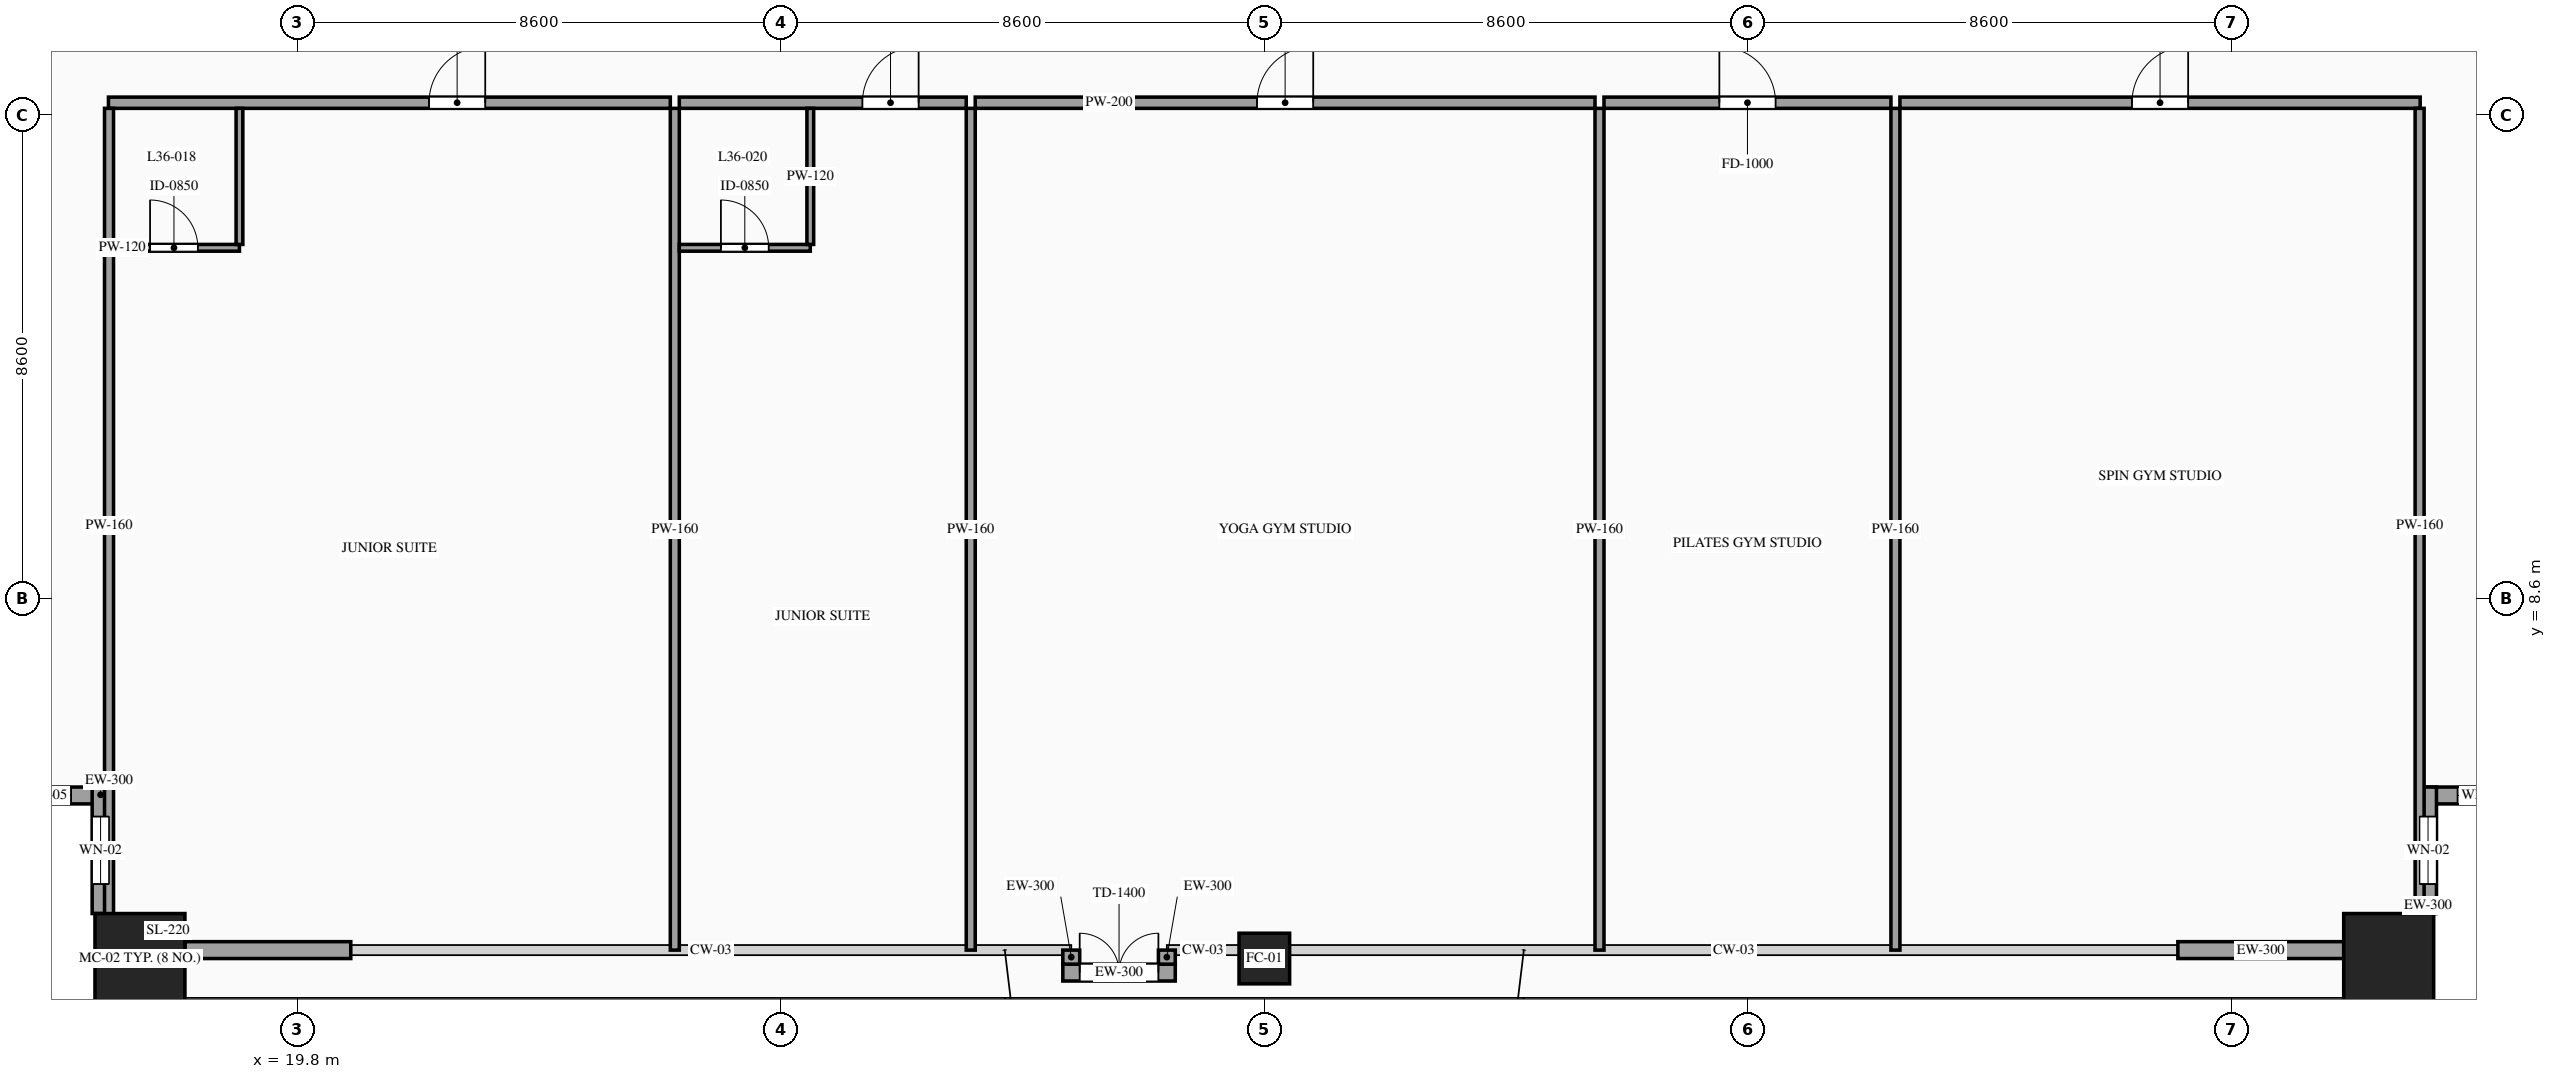
"""IFC4 building model, lengths in metres.
Left out: names, types, materials, properties, quantities, classifications, styles, units other than length and angle.
Written with IfcOpenShell. Run it as: python <this file> out.ifc"""

import sys

from ifc_helpers import new_model, si_unit, direction, frame, frame_2d, origin, origin_2d, place, context, subcontext, project, spatial, rectangle, hollow_rectangle, extrude, source, transform, mapped, element, fill, save


model = new_model("IFC4")
c1 = context("Model", 3, precision=1e-05, world=origin(), true_north=direction((0.0, 1.0)))
c2 = subcontext(c1, "Body", "Model", "MODEL_VIEW")
j1 = project(units=[si_unit("LENGTHUNIT", "METRE"), si_unit("PLANEANGLEUNIT", "RADIAN")], contexts=[c1])
p1 = place(None, origin())
s1 = spatial("IfcSite", under=j1, at=p1, CompositionType="ELEMENT")
p2 = place(p1, origin())
s2 = spatial("IfcBuilding", under=s1, at=p2, CompositionType="ELEMENT")
p3 = place(p2, frame((0.0, 0.0, 138.0)))
s3 = spatial("IfcBuildingStorey", under=s2, at=p3, CompositionType="ELEMENT", Elevation=138.0)
m1 = source(origin(), c2, "Body", "SweptSolid", [
    extrude(hollow_rectangle(XDim=1.6, YDim=1.6, WallThickness=0.07, at=origin_2d()), origin(), (0.0, 0.0, 1.0), 3.6),
])
p4 = place(p3, frame((17.0, 2.2, 0.0), z_axis=(0.0, 0.0, 1.0), x_axis=(1.0, 0.0, 0.0)))
e1 = element("IfcColumn", 1, at=p4, inside=s3, PredefinedType="COLUMN", context=c2, shape_type="MappedRepresentation", body=[
    mapped(m1, transform((0.0, 0.0, 0.0), scale=1.0)),
])
m2 = source(origin(), c2, "Body", "SweptSolid", [
    extrude(hollow_rectangle(XDim=0.9, YDim=0.9, WallThickness=0.042, at=origin_2d()), origin(), (0.0, 0.0, 1.0), 3.6),
])
p5 = place(p3, frame((37.0, 2.2, 0.0), z_axis=(0.0, 0.0, 1.0), x_axis=(1.0, 0.0, 0.0)))
e2 = element("IfcColumn", 2, at=p5, inside=s3, PredefinedType="COLUMN", context=c2, shape_type="MappedRepresentation", body=[
    mapped(m2, transform((0.0, 0.0, 0.0), scale=1.0)),
])
p6 = place(p3, frame((57.0, 2.2, 0.0), z_axis=(0.0, 0.0, 1.0), x_axis=(1.0, 0.0, 0.0)))
e3 = element("IfcColumn", 3, at=p6, inside=s3, PredefinedType="COLUMN", context=c2, shape_type="MappedRepresentation", body=[
    mapped(m1, transform((0.0, 0.0, 0.0), scale=1.0)),
])
p7 = place(p3, frame((14.2, 5.1, 0.0), z_axis=(0.0, 0.0, 1.0), x_axis=(1.0, 0.0, 0.0)))
e4 = element("IfcWall", 4, at=p7, inside=s3, PredefinedType="SOLIDWALL", context=c2, shape_type="SweptSolid", body=[
    extrude(rectangle(XDim=2.25, YDim=0.3, at=frame_2d((1.125, 0.0))), origin(), (0.0, 0.0, 1.0), 3.38),
])
p8 = place(p7, frame((0.675, 0.0, 0.85)))
e5 = element("IfcOpeningElement", 5, at=p8, cuts=e4, PredefinedType="OPENING", context=c2, shape_type="SweptSolid", body=[
    extrude(rectangle(XDim=0.9, YDim=1.5, at=frame_2d((0.45, 0.75))), frame((0.0, 0.165, 0.0), z_axis=(0.0, -1.0, 0.0), x_axis=(1.0, 0.0, 0.0)), (0.0, 0.0, 1.0), 0.33),
])
p9 = place(p3, frame((16.3, 5.25, 0.0), z_axis=(0.0, 0.0, 1.0), x_axis=(0.0, -1.0, 0.0)))
e6 = element("IfcWall", 6, at=p9, inside=s3, PredefinedType="SOLIDWALL", context=c2, shape_type="SweptSolid", body=[
    extrude(rectangle(XDim=2.25, YDim=0.3, at=frame_2d((1.125, 0.0))), origin(), (0.0, 0.0, 1.0), 3.38),
])
p10 = place(p9, frame((0.525, 0.0, 0.85)))
e7 = element("IfcOpeningElement", 7, at=p10, cuts=e6, PredefinedType="OPENING", context=c2, shape_type="SweptSolid", body=[
    extrude(rectangle(XDim=1.2, YDim=2.1, at=frame_2d((0.6, 1.05))), frame((0.0, 0.165, 0.0), z_axis=(0.0, -1.0, 0.0), x_axis=(1.0, 0.0, 0.0)), (0.0, 0.0, 1.0), 0.33),
])
p11 = place(p3, frame((57.55, 5.1, 0.0), z_axis=(0.0, 0.0, 1.0), x_axis=(1.0, 0.0, 0.0)))
e8 = element("IfcWall", 8, at=p11, inside=s3, PredefinedType="SOLIDWALL", context=c2, shape_type="SweptSolid", body=[
    extrude(rectangle(XDim=2.25, YDim=0.3, at=frame_2d((1.125, 0.0))), origin(), (0.0, 0.0, 1.0), 3.38),
])
p12 = place(p11, frame((0.675, 0.0, 0.85)))
e9 = element("IfcOpeningElement", 9, at=p12, cuts=e8, PredefinedType="OPENING", context=c2, shape_type="SweptSolid", body=[
    extrude(rectangle(XDim=0.9, YDim=1.5, at=frame_2d((0.45, 0.75))), frame((0.0, 0.165, 0.0), z_axis=(0.0, -1.0, 0.0), x_axis=(1.0, 0.0, 0.0)), (0.0, 0.0, 1.0), 0.33),
])
p13 = place(p3, frame((57.7, 3.0, 0.0), z_axis=(0.0, 0.0, 1.0), x_axis=(0.0, 1.0, 0.0)))
e10 = element("IfcWall", 10, at=p13, inside=s3, PredefinedType="SOLIDWALL", context=c2, shape_type="SweptSolid", body=[
    extrude(rectangle(XDim=2.25, YDim=0.3, at=frame_2d((1.125, 0.0))), origin(), (0.0, 0.0, 1.0), 3.38),
])
p14 = place(p13, frame((0.525, 0.0, 0.85)))
e11 = element("IfcOpeningElement", 11, at=p14, cuts=e10, PredefinedType="OPENING", context=c2, shape_type="SweptSolid", body=[
    extrude(rectangle(XDim=1.2, YDim=2.1, at=frame_2d((0.6, 1.05))), frame((0.0, 0.165, 0.0), z_axis=(0.0, -1.0, 0.0), x_axis=(1.0, 0.0, 0.0)), (0.0, 0.0, 1.0), 0.33),
])
m3 = source(origin(), c2, "Body", "SweptSolid", [
    extrude(rectangle(XDim=2.95, YDim=0.3, at=frame_2d((1.475, 0.0))), origin(), (0.0, 0.0, 1.0), 2.775),
])
for number, where, z_axis, x_axis in (
    (12, (17.8, 2.35, 0.0), (0.0, 0.0, 1.0), (1.0, 0.0, 0.0)),
    (13, (53.25, 2.35, 0.0), (0.0, 0.0, 1.0), (1.0, 0.0, 0.0)),
):
    element("IfcWall", number, at=place(p3, frame(where, z_axis=z_axis, x_axis=x_axis)), inside=s3, PredefinedType="SOLIDWALL", context=c2, shape_type="MappedRepresentation", body=[
        mapped(m3, transform((0.0, 0.0, 0.0), scale=1.0)),
    ])
p15 = place(p3, frame((33.416, 1.95, 0.0), z_axis=(0.0, 0.0, 1.0), x_axis=(1.0, 0.0, 0.0)))
e14 = element("IfcWall", 14, at=p15, inside=s3, PredefinedType="SOLIDWALL", context=c2, shape_type="SweptSolid", body=[
    extrude(rectangle(XDim=2.0, YDim=0.3, at=frame_2d((1.0, 0.0))), origin(), (0.0, 0.0, 1.0), 3.38),
])
p16 = place(p15, frame((0.3, 0.0, 0.0)))
e15 = element("IfcOpeningElement", 15, at=p16, cuts=e14, PredefinedType="OPENING", context=c2, shape_type="SweptSolid", body=[
    extrude(rectangle(XDim=1.4, YDim=2.3, at=frame_2d((0.7, 1.15))), frame((0.0, 0.165, 0.0), z_axis=(0.0, -1.0, 0.0), x_axis=(1.0, 0.0, 0.0)), (0.0, 0.0, 1.0), 0.33),
])
m4 = source(origin(), c2, "Body", "SweptSolid", [
    extrude(rectangle(XDim=0.25, YDim=0.3, at=frame_2d((0.125, 0.0))), origin(), (0.0, 0.0, 1.0), 3.38),
])
for number, where, z_axis, x_axis in (
    (16, (33.566, 2.35, 0.0), (0.0, 0.0, 1.0), (0.0, -1.0, 0.0)),
    (17, (35.266, 2.1, 0.0), (0.0, 0.0, 1.0), (0.0, 1.0, 0.0)),
):
    element("IfcWall", number, at=place(p3, frame(where, z_axis=z_axis, x_axis=x_axis)), inside=s3, PredefinedType="SOLIDWALL", context=c2, shape_type="MappedRepresentation", body=[
        mapped(m4, transform((0.0, 0.0, 0.0), scale=1.0)),
    ])
p17 = place(p3, frame((16.44, 17.42, 0.0), z_axis=(0.0, 0.0, 1.0), x_axis=(1.0, 0.0, 0.0)))
e18 = element("IfcWall", 18, at=p17, inside=s3, PredefinedType="PARTITIONING", context=c2, shape_type="SweptSolid", body=[
    extrude(rectangle(XDim=9.994, YDim=0.2, at=frame_2d((4.997, 0.0))), origin(), (0.0, 0.0, 1.0), 3.38),
])
p18 = place(p17, frame((5.702, 0.0, 0.0)))
e19 = element("IfcOpeningElement", 19, at=p18, cuts=e18, PredefinedType="OPENING", context=c2, shape_type="SweptSolid", body=[
    extrude(rectangle(XDim=1.0, YDim=2.2, at=frame_2d((0.5, 1.1))), frame((0.0, 0.115, 0.0), z_axis=(0.0, -1.0, 0.0), x_axis=(1.0, 0.0, 0.0)), (0.0, 0.0, 1.0), 0.23),
])
m5 = source(origin(), c2, "Body", "SweptSolid", [
    extrude(rectangle(XDim=14.97, YDim=0.16, at=frame_2d((7.485, 0.0))), origin(), (0.0, 0.0, 1.0), 3.38),
])
p19 = place(p3, frame((26.514, 2.35, 0.0), z_axis=(0.0, 0.0, 1.0), x_axis=(0.0, 1.0, 0.0)))
e20 = element("IfcWall", 20, at=p19, inside=s3, PredefinedType="PARTITIONING", context=c2, shape_type="MappedRepresentation", body=[
    mapped(m5, transform((0.0, 0.0, 0.0), scale=1.0)),
])
p20 = place(p3, frame((16.44, 14.84, 0.0), z_axis=(0.0, 0.0, 1.0), x_axis=(1.0, 0.0, 0.0)))
e21 = element("IfcWall", 21, at=p20, inside=s3, PredefinedType="PARTITIONING", context=c2, shape_type="SweptSolid", body=[
    extrude(rectangle(XDim=2.33, YDim=0.12, at=frame_2d((1.165, 0.0))), origin(), (0.0, 0.0, 1.0), 3.38),
])
p21 = place(p20, frame((0.74, 0.0, 0.0)))
e22 = element("IfcOpeningElement", 22, at=p21, cuts=e21, PredefinedType="OPENING", context=c2, shape_type="SweptSolid", body=[
    extrude(rectangle(XDim=0.85, YDim=2.1, at=frame_2d((0.425, 1.05))), frame((0.0, 0.075, 0.0), z_axis=(0.0, -1.0, 0.0), x_axis=(1.0, 0.0, 0.0)), (0.0, 0.0, 1.0), 0.15),
])
m6 = source(origin(), c2, "Body", "SweptSolid", [
    extrude(rectangle(XDim=2.42, YDim=0.12, at=frame_2d((1.21, 0.0))), origin(), (0.0, 0.0, 1.0), 3.38),
])
p22 = place(p3, frame((18.77, 14.9, 0.0), z_axis=(0.0, 0.0, 1.0), x_axis=(0.0, 1.0, 0.0)))
e23 = element("IfcWall", 23, at=p22, inside=s3, PredefinedType="PARTITIONING", context=c2, shape_type="MappedRepresentation", body=[
    mapped(m6, transform((0.0, 0.0, 0.0), scale=1.0)),
])
p23 = place(p3, frame((26.594, 17.42, 0.0), z_axis=(0.0, 0.0, 1.0), x_axis=(1.0, 0.0, 0.0)))
e24 = element("IfcWall", 24, at=p23, inside=s3, PredefinedType="PARTITIONING", context=c2, shape_type="SweptSolid", body=[
    extrude(rectangle(XDim=5.104, YDim=0.2, at=frame_2d((2.552, 0.0))), origin(), (0.0, 0.0, 1.0), 3.38),
])
p24 = place(p23, frame((3.257, 0.0, 0.0)))
e25 = element("IfcOpeningElement", 25, at=p24, cuts=e24, PredefinedType="OPENING", context=c2, shape_type="SweptSolid", body=[
    extrude(rectangle(XDim=1.0, YDim=2.2, at=frame_2d((0.5, 1.1))), frame((0.0, 0.115, 0.0), z_axis=(0.0, -1.0, 0.0), x_axis=(1.0, 0.0, 0.0)), (0.0, 0.0, 1.0), 0.23),
])
p25 = place(p3, frame((31.778, 2.35, 0.0), z_axis=(0.0, 0.0, 1.0), x_axis=(0.0, 1.0, 0.0)))
e26 = element("IfcWall", 26, at=p25, inside=s3, PredefinedType="PARTITIONING", context=c2, shape_type="MappedRepresentation", body=[
    mapped(m5, transform((0.0, 0.0, 0.0), scale=1.0)),
])
p26 = place(p3, frame((26.594, 14.84, 0.0), z_axis=(0.0, 0.0, 1.0), x_axis=(1.0, 0.0, 0.0)))
e27 = element("IfcWall", 27, at=p26, inside=s3, PredefinedType="PARTITIONING", context=c2, shape_type="SweptSolid", body=[
    extrude(rectangle(XDim=2.33, YDim=0.12, at=frame_2d((1.165, 0.0))), origin(), (0.0, 0.0, 1.0), 3.38),
])
p27 = place(p26, frame((0.74, 0.0, 0.0)))
e28 = element("IfcOpeningElement", 28, at=p27, cuts=e27, PredefinedType="OPENING", context=c2, shape_type="SweptSolid", body=[
    extrude(rectangle(XDim=0.85, YDim=2.1, at=frame_2d((0.425, 1.05))), frame((0.0, 0.075, 0.0), z_axis=(0.0, -1.0, 0.0), x_axis=(1.0, 0.0, 0.0)), (0.0, 0.0, 1.0), 0.15),
])
p28 = place(p3, frame((28.924, 14.9, 0.0), z_axis=(0.0, 0.0, 1.0), x_axis=(0.0, 1.0, 0.0)))
e29 = element("IfcWall", 29, at=p28, inside=s3, PredefinedType="PARTITIONING", context=c2, shape_type="MappedRepresentation", body=[
    mapped(m6, transform((0.0, 0.0, 0.0), scale=1.0)),
])
p29 = place(p3, frame((31.858, 17.42, 0.0), z_axis=(0.0, 0.0, 1.0), x_axis=(1.0, 0.0, 0.0)))
e30 = element("IfcWall", 30, at=p29, inside=s3, PredefinedType="PARTITIONING", context=c2, shape_type="SweptSolid", body=[
    extrude(rectangle(XDim=11.024, YDim=0.2, at=frame_2d((5.512, 0.0))), origin(), (0.0, 0.0, 1.0), 3.38),
])
p30 = place(p29, frame((5.012, 0.0, 0.0)))
e31 = element("IfcOpeningElement", 31, at=p30, cuts=e30, PredefinedType="OPENING", context=c2, shape_type="SweptSolid", body=[
    extrude(rectangle(XDim=1.0, YDim=2.2, at=frame_2d((0.5, 1.1))), frame((0.0, 0.115, 0.0), z_axis=(0.0, -1.0, 0.0), x_axis=(1.0, 0.0, 0.0)), (0.0, 0.0, 1.0), 0.23),
])
p31 = place(p3, frame((42.962, 2.35, 0.0), z_axis=(0.0, 0.0, 1.0), x_axis=(0.0, 1.0, 0.0)))
e32 = element("IfcWall", 32, at=p31, inside=s3, PredefinedType="PARTITIONING", context=c2, shape_type="MappedRepresentation", body=[
    mapped(m5, transform((0.0, 0.0, 0.0), scale=1.0)),
])
p32 = place(p3, frame((43.042, 17.42, 0.0), z_axis=(0.0, 0.0, 1.0), x_axis=(1.0, 0.0, 0.0)))
e33 = element("IfcWall", 33, at=p32, inside=s3, PredefinedType="PARTITIONING", context=c2, shape_type="SweptSolid", body=[
    extrude(rectangle(XDim=5.104, YDim=0.2, at=frame_2d((2.552, 0.0))), origin(), (0.0, 0.0, 1.0), 3.38),
])
p33 = place(p32, frame((2.052, 0.0, 0.0)))
e34 = element("IfcOpeningElement", 34, at=p33, cuts=e33, PredefinedType="OPENING", context=c2, shape_type="SweptSolid", body=[
    extrude(rectangle(XDim=1.0, YDim=2.2, at=frame_2d((0.5, 1.1))), frame((0.0, 0.115, 0.0), z_axis=(0.0, -1.0, 0.0), x_axis=(1.0, 0.0, 0.0)), (0.0, 0.0, 1.0), 0.23),
])
p34 = place(p3, frame((48.226, 2.35, 0.0), z_axis=(0.0, 0.0, 1.0), x_axis=(0.0, 1.0, 0.0)))
e35 = element("IfcWall", 35, at=p34, inside=s3, PredefinedType="PARTITIONING", context=c2, shape_type="MappedRepresentation", body=[
    mapped(m5, transform((0.0, 0.0, 0.0), scale=1.0)),
])
p35 = place(p3, frame((48.306, 17.42, 0.0), z_axis=(0.0, 0.0, 1.0), x_axis=(1.0, 0.0, 0.0)))
e36 = element("IfcWall", 36, at=p35, inside=s3, PredefinedType="PARTITIONING", context=c2, shape_type="SweptSolid", body=[
    extrude(rectangle(XDim=9.254, YDim=0.2, at=frame_2d((4.627, 0.0))), origin(), (0.0, 0.0, 1.0), 3.38),
])
p36 = place(p35, frame((4.127, 0.0, 0.0)))
e37 = element("IfcOpeningElement", 37, at=p36, cuts=e36, PredefinedType="OPENING", context=c2, shape_type="SweptSolid", body=[
    extrude(rectangle(XDim=1.0, YDim=2.2, at=frame_2d((0.5, 1.1))), frame((0.0, 0.115, 0.0), z_axis=(0.0, -1.0, 0.0), x_axis=(1.0, 0.0, 0.0)), (0.0, 0.0, 1.0), 0.23),
])
m7 = source(origin(), c2, "Body", "SweptSolid", [
    extrude(rectangle(XDim=14.82, YDim=0.16, at=frame_2d((7.41, 0.0))), origin(), (0.0, 0.0, 1.0), 3.38),
])
for number, where, z_axis, x_axis in (
    (38, (16.45, 2.5, 0.0), (0.0, 0.0, 1.0), (0.0, 1.0, 0.0)),
    (39, (57.55, 2.5, 0.0), (0.0, 0.0, 1.0), (0.0, 1.0, 0.0)),
):
    element("IfcWall", number, at=place(p3, frame(where, z_axis=z_axis, x_axis=x_axis)), inside=s3, PredefinedType="PARTITIONING", context=c2, shape_type="MappedRepresentation", body=[
        mapped(m7, transform((0.0, 0.0, 0.0), scale=1.0)),
    ])
m8 = source(origin(), c2, "Body", "SweptSolid", [
    extrude(rectangle(XDim=0.9, YDim=1.5, at=frame_2d((0.45, 0.75))), frame((0.0, 0.03, 0.0), z_axis=(0.0, -1.0, 0.0), x_axis=(1.0, 0.0, 0.0)), (0.0, 0.0, 1.0), 0.06),
])
p37 = place(p8, origin())
e40 = element("IfcWindow", 40, at=p37, inside=s3, PartitioningType="SINGLE_PANEL", PredefinedType="WINDOW", context=c2, shape_type="MappedRepresentation", body=[
    mapped(m8, transform((0.0, 0.0, 0.0), scale=1.0)),
])
fill(e5, e40)
m9 = source(origin(), c2, "Body", "SweptSolid", [
    extrude(rectangle(XDim=1.2, YDim=2.1, at=frame_2d((0.6, 1.05))), frame((0.0, 0.03, 0.0), z_axis=(0.0, -1.0, 0.0), x_axis=(1.0, 0.0, 0.0)), (0.0, 0.0, 1.0), 0.06),
])
p38 = place(p10, origin())
e41 = element("IfcWindow", 41, at=p38, inside=s3, PartitioningType="SINGLE_PANEL", PredefinedType="WINDOW", context=c2, shape_type="MappedRepresentation", body=[
    mapped(m9, transform((0.0, 0.0, 0.0), scale=1.0)),
])
fill(e7, e41)
p39 = place(p12, origin())
e42 = element("IfcWindow", 42, at=p39, inside=s3, PartitioningType="SINGLE_PANEL", PredefinedType="WINDOW", context=c2, shape_type="MappedRepresentation", body=[
    mapped(m8, transform((0.0, 0.0, 0.0), scale=1.0)),
])
fill(e9, e42)
p40 = place(p14, origin())
e43 = element("IfcWindow", 43, at=p40, inside=s3, PartitioningType="SINGLE_PANEL", PredefinedType="WINDOW", context=c2, shape_type="MappedRepresentation", body=[
    mapped(m9, transform((0.0, 0.0, 0.0), scale=1.0)),
])
fill(e11, e43)
m10 = source(origin(), c2, "Body", "SweptSolid", [
    extrude(rectangle(XDim=1.4, YDim=2.3, at=frame_2d((0.7, 1.15))), frame((0.0, 0.025, 0.0), z_axis=(0.0, -1.0, 0.0), x_axis=(1.0, 0.0, 0.0)), (0.0, 0.0, 1.0), 0.05),
])
p41 = place(p16, origin())
e44 = element("IfcDoor", 44, at=p41, inside=s3, OperationType="DOUBLE_DOOR_SINGLE_SWING", PredefinedType="DOOR", context=c2, shape_type="MappedRepresentation", body=[
    mapped(m10, transform((0.0, 0.0, 0.0), scale=1.0)),
])
fill(e15, e44)
m11 = source(origin(), c2, "Body", "SweptSolid", [
    extrude(rectangle(XDim=1.0, YDim=2.2, at=frame_2d((0.5, 1.1))), frame((0.0, 0.025, 0.0), z_axis=(0.0, -1.0, 0.0), x_axis=(1.0, 0.0, 0.0)), (0.0, 0.0, 1.0), 0.05),
])
p42 = place(p18, origin())
e45 = element("IfcDoor", 45, at=p42, inside=s3, OperationType="SINGLE_SWING_RIGHT", PredefinedType="DOOR", context=c2, shape_type="MappedRepresentation", body=[
    mapped(m11, transform((0.0, 0.0, 0.0), scale=1.0)),
])
fill(e19, e45)
m12 = source(origin(), c2, "Body", "SweptSolid", [
    extrude(rectangle(XDim=0.85, YDim=2.1, at=frame_2d((0.425, 1.05))), frame((0.0, 0.025, 0.0), z_axis=(0.0, -1.0, 0.0), x_axis=(1.0, 0.0, 0.0)), (0.0, 0.0, 1.0), 0.05),
])
p43 = place(p21, origin())
e46 = element("IfcDoor", 46, at=p43, inside=s3, OperationType="SINGLE_SWING_LEFT", PredefinedType="DOOR", context=c2, shape_type="MappedRepresentation", body=[
    mapped(m12, transform((0.0, 0.0, 0.0), scale=1.0)),
])
fill(e22, e46)
p44 = place(p24, origin())
e47 = element("IfcDoor", 47, at=p44, inside=s3, OperationType="SINGLE_SWING_RIGHT", PredefinedType="DOOR", context=c2, shape_type="MappedRepresentation", body=[
    mapped(m11, transform((0.0, 0.0, 0.0), scale=1.0)),
])
fill(e25, e47)
p45 = place(p27, origin())
e48 = element("IfcDoor", 48, at=p45, inside=s3, OperationType="SINGLE_SWING_LEFT", PredefinedType="DOOR", context=c2, shape_type="MappedRepresentation", body=[
    mapped(m12, transform((0.0, 0.0, 0.0), scale=1.0)),
])
fill(e28, e48)
p46 = place(p30, origin())
e49 = element("IfcDoor", 49, at=p46, inside=s3, OperationType="SINGLE_SWING_RIGHT", PredefinedType="DOOR", context=c2, shape_type="MappedRepresentation", body=[
    mapped(m11, transform((0.0, 0.0, 0.0), scale=1.0)),
])
fill(e31, e49)
p47 = place(p33, origin())
e50 = element("IfcDoor", 50, at=p47, inside=s3, OperationType="SINGLE_SWING_LEFT", PredefinedType="DOOR", context=c2, shape_type="MappedRepresentation", body=[
    mapped(m11, transform((0.0, 0.0, 0.0), scale=1.0)),
])
fill(e34, e50)
p48 = place(p36, origin())
e51 = element("IfcDoor", 51, at=p48, inside=s3, OperationType="SINGLE_SWING_RIGHT", PredefinedType="DOOR", context=c2, shape_type="MappedRepresentation", body=[
    mapped(m11, transform((0.0, 0.0, 0.0), scale=1.0)),
])
fill(e37, e51)
save(model, sys.argv[1])
